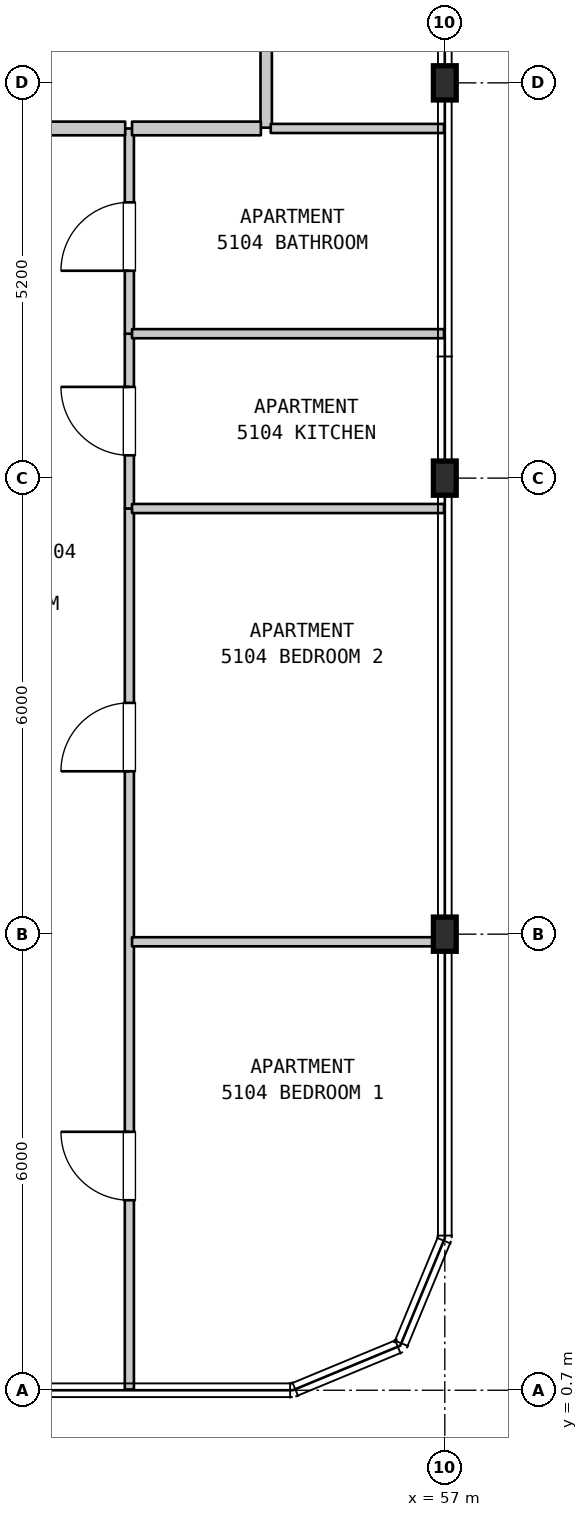
"""IFC4 building model, lengths in metres.
Left out: names, types, materials, properties, quantities, classifications, styles, units other than length and angle.
Written with IfcOpenShell. Run it as: python <this file> out.ifc"""

import sys

from ifc_helpers import new_model, si_unit, direction, frame, frame_2d, origin, origin_2d, place, context, subcontext, project, spatial, rectangle, i_section, extrude, element, fill, save


model = new_model("IFC4")
c1 = context("Model", 3, precision=1e-05, world=origin(), true_north=direction((0.0, 1.0)))
c2 = subcontext(c1, "Body", "Model", "MODEL_VIEW")
j1 = project(units=[si_unit("LENGTHUNIT", "METRE"), si_unit("PLANEANGLEUNIT", "RADIAN")], contexts=[c1])
p1 = place(None, origin())
s1 = spatial("IfcSite", under=j1, at=p1, CompositionType="ELEMENT")
p2 = place(p1, origin())
s2 = spatial("IfcBuilding", under=s1, at=p2, CompositionType="ELEMENT")
p3 = place(p2, frame((0.0, 0.0, 206.9)))
s3 = spatial("IfcBuildingStorey", under=s2, at=p3, CompositionType="ELEMENT", Elevation=206.9)
for number, where, z_axis, x_axis in (
    (1, (57.0, 6.7, 0.0), (0.0, 0.0, 1.0), (1.0, 0.0, 0.0)),
    (2, (57.0, 12.7, 0.0), (0.0, 0.0, 1.0), (1.0, 0.0, 0.0)),
    (3, (57.0, 17.9, 0.0), (0.0, 0.0, 1.0), (1.0, 0.0, 0.0)),
):
    element("IfcColumn", number, at=place(p3, frame(where, z_axis=z_axis, x_axis=x_axis)), inside=s3, PredefinedType="COLUMN", context=c2, shape_type="SweptSolid", body=[
        extrude(i_section(OverallWidth=0.3, OverallDepth=0.45, WebThickness=0.014, FlangeThickness=0.026, FilletRadius=0.027, at=origin_2d()), origin(), (0.0, 0.0, 1.0), 3.7),
    ])
p4 = place(p3, frame((52.85, 0.71, 0.0), z_axis=(0.0, 0.0, 1.0), x_axis=(0.0, 1.0, 0.0)))
e4 = element("IfcWall", 4, at=p4, inside=s3, PredefinedType="PARTITIONING", context=c2, shape_type="SweptSolid", body=[
    extrude(rectangle(XDim=11.59, YDim=0.12, at=frame_2d((5.795, 0.0))), origin(), (0.0, 0.0, 1.0), 3.39),
])
p5 = place(p4, frame((2.49, 0.0, 0.0)))
e5 = element("IfcOpeningElement", 5, at=p5, cuts=e4, PredefinedType="OPENING", context=c2, shape_type="SweptSolid", body=[
    extrude(rectangle(XDim=0.9, YDim=2.15, at=frame_2d((0.45, 1.075))), frame((0.0, 0.07, 0.0), z_axis=(0.0, -1.0, 0.0), x_axis=(1.0, 0.0, 0.0)), (0.0, 0.0, 1.0), 0.14),
])
p6 = place(p4, frame((8.133, 0.0, 0.0)))
e6 = element("IfcOpeningElement", 6, at=p6, cuts=e4, PredefinedType="OPENING", context=c2, shape_type="SweptSolid", body=[
    extrude(rectangle(XDim=0.9, YDim=2.15, at=frame_2d((0.45, 1.075))), frame((0.0, 0.07, 0.0), z_axis=(0.0, -1.0, 0.0), x_axis=(1.0, 0.0, 0.0)), (0.0, 0.0, 1.0), 0.14),
])
p7 = place(p3, frame((52.85, 12.3, 0.0), z_axis=(0.0, 0.0, 1.0), x_axis=(0.0, 1.0, 0.0)))
e7 = element("IfcWall", 7, at=p7, inside=s3, PredefinedType="PARTITIONING", context=c2, shape_type="SweptSolid", body=[
    extrude(rectangle(XDim=2.3, YDim=0.12, at=frame_2d((1.15, 0.0))), origin(), (0.0, 0.0, 1.0), 3.39),
])
p8 = place(p7, frame((0.7, 0.0, 0.0)))
e8 = element("IfcOpeningElement", 8, at=p8, cuts=e7, PredefinedType="OPENING", context=c2, shape_type="SweptSolid", body=[
    extrude(rectangle(XDim=0.9, YDim=2.15, at=frame_2d((0.45, 1.075))), frame((0.0, 0.07, 0.0), z_axis=(0.0, -1.0, 0.0), x_axis=(1.0, 0.0, 0.0)), (0.0, 0.0, 1.0), 0.14),
])
p9 = place(p3, frame((52.85, 14.6, 0.0), z_axis=(0.0, 0.0, 1.0), x_axis=(0.0, 1.0, 0.0)))
e9 = element("IfcWall", 9, at=p9, inside=s3, PredefinedType="PARTITIONING", context=c2, shape_type="SweptSolid", body=[
    extrude(rectangle(XDim=2.7, YDim=0.12, at=frame_2d((1.35, 0.0))), origin(), (0.0, 0.0, 1.0), 3.39),
])
p10 = place(p9, frame((0.828, 0.0, 0.0)))
e10 = element("IfcOpeningElement", 10, at=p10, cuts=e9, PredefinedType="OPENING", context=c2, shape_type="SweptSolid", body=[
    extrude(rectangle(XDim=0.9, YDim=2.1, at=frame_2d((0.45, 1.05))), frame((0.0, 0.07, 0.0), z_axis=(0.0, -1.0, 0.0), x_axis=(1.0, 0.0, 0.0)), (0.0, 0.0, 1.0), 0.14),
])
p11 = place(p3, frame((54.65, 17.31, 0.0), z_axis=(0.0, 0.0, 1.0), x_axis=(0.0, 1.0, 0.0)))
e11 = element("IfcWall", 11, at=p11, inside=s3, PredefinedType="STANDARD", context=c2, shape_type="SweptSolid", body=[
    extrude(rectangle(XDim=2.19, YDim=0.15, at=frame_2d((1.095, 0.0))), origin(), (0.0, 0.0, 1.0), 3.39),
])
p12 = place(p3, frame((52.885, 6.6, 0.0), z_axis=(0.0, 0.0, 1.0), x_axis=(1.0, 0.0, 0.0)))
e12 = element("IfcWall", 12, at=p12, inside=s3, PredefinedType="PARTITIONING", context=c2, shape_type="SweptSolid", body=[
    extrude(rectangle(XDim=4.105, YDim=0.12, at=frame_2d((2.052, 0.0))), origin(), (0.0, 0.0, 1.0), 2.79),
])
for number, where, z_axis, x_axis in (
    (13, (52.885, 12.3, 0.0), (0.0, 0.0, 1.0), (1.0, 0.0, 0.0)),
    (14, (52.885, 14.6, 0.0), (0.0, 0.0, 1.0), (1.0, 0.0, 0.0)),
):
    element("IfcWall", number, at=place(p3, frame(where, z_axis=z_axis, x_axis=x_axis)), inside=s3, PredefinedType="PARTITIONING", context=c2, shape_type="SweptSolid", body=[
        extrude(rectangle(XDim=4.105, YDim=0.12, at=frame_2d((2.052, 0.0))), origin(), (0.0, 0.0, 1.0), 3.39),
    ])
p13 = place(p3, frame((49.285, 17.3, 0.0), z_axis=(0.0, 0.0, 1.0), x_axis=(1.0, 0.0, 0.0)))
e15 = element("IfcWall", 15, at=p13, inside=s3, PredefinedType="STANDARD", context=c2, shape_type="SweptSolid", body=[
    extrude(rectangle(XDim=3.51, YDim=0.18, at=frame_2d((1.755, 0.0))), origin(), (0.0, 0.0, 1.0), 3.39),
])
p14 = place(p13, frame((1.185, 0.0, 0.0)))
e16 = element("IfcOpeningElement", 16, at=p14, cuts=e15, PredefinedType="OPENING", context=c2, shape_type="SweptSolid", body=[
    extrude(rectangle(XDim=1.0, YDim=2.15, at=frame_2d((0.5, 1.075))), frame((0.0, 0.1, 0.0), z_axis=(0.0, -1.0, 0.0), x_axis=(1.0, 0.0, 0.0)), (0.0, 0.0, 1.0), 0.2),
])
p15 = place(p3, frame((52.885, 17.3, 0.0), z_axis=(0.0, 0.0, 1.0), x_axis=(1.0, 0.0, 0.0)))
e17 = element("IfcWall", 17, at=p15, inside=s3, PredefinedType="STANDARD", context=c2, shape_type="SweptSolid", body=[
    extrude(rectangle(XDim=1.695, YDim=0.18, at=frame_2d((0.848, 0.0))), origin(), (0.0, 0.0, 1.0), 3.39),
])
p16 = place(p3, frame((54.71, 17.3, 0.0), z_axis=(0.0, 0.0, 1.0), x_axis=(1.0, 0.0, 0.0)))
e18 = element("IfcWall", 18, at=p16, inside=s3, PredefinedType="PARTITIONING", context=c2, shape_type="SweptSolid", body=[
    extrude(rectangle(XDim=2.28, YDim=0.12, at=frame_2d((1.14, 0.0))), origin(), (0.0, 0.0, 1.0), 3.39),
])
p17 = place(p5, origin())
e19 = element("IfcDoor", 19, at=p17, inside=s3, OperationType="SINGLE_SWING_RIGHT", PredefinedType="DOOR", context=c2, shape_type="SweptSolid", body=[
    extrude(rectangle(XDim=0.9, YDim=2.15, at=frame_2d((0.45, 1.075))), frame((0.0, 0.025, 0.0), z_axis=(0.0, -1.0, 0.0), x_axis=(1.0, 0.0, 0.0)), (0.0, 0.0, 1.0), 0.05),
])
fill(e5, e19)
p18 = place(p6, origin())
e20 = element("IfcDoor", 20, at=p18, inside=s3, OperationType="SINGLE_SWING_LEFT", PredefinedType="DOOR", context=c2, shape_type="SweptSolid", body=[
    extrude(rectangle(XDim=0.9, YDim=2.15, at=frame_2d((0.45, 1.075))), frame((0.0, 0.025, 0.0), z_axis=(0.0, -1.0, 0.0), x_axis=(1.0, 0.0, 0.0)), (0.0, 0.0, 1.0), 0.05),
])
fill(e6, e20)
p19 = place(p8, origin())
e21 = element("IfcDoor", 21, at=p19, inside=s3, OperationType="SINGLE_SWING_RIGHT", PredefinedType="DOOR", context=c2, shape_type="SweptSolid", body=[
    extrude(rectangle(XDim=0.9, YDim=2.15, at=frame_2d((0.45, 1.075))), frame((0.0, 0.025, 0.0), z_axis=(0.0, -1.0, 0.0), x_axis=(1.0, 0.0, 0.0)), (0.0, 0.0, 1.0), 0.05),
])
fill(e8, e21)
p20 = place(p10, origin())
e22 = element("IfcDoor", 22, at=p20, inside=s3, OperationType="SINGLE_SWING_LEFT", PredefinedType="DOOR", context=c2, shape_type="SweptSolid", body=[
    extrude(rectangle(XDim=0.9, YDim=2.1, at=frame_2d((0.45, 1.05))), frame((0.0, 0.025, 0.0), z_axis=(0.0, -1.0, 0.0), x_axis=(1.0, 0.0, 0.0)), (0.0, 0.0, 1.0), 0.05),
])
fill(e10, e22)
save(model, sys.argv[1])
